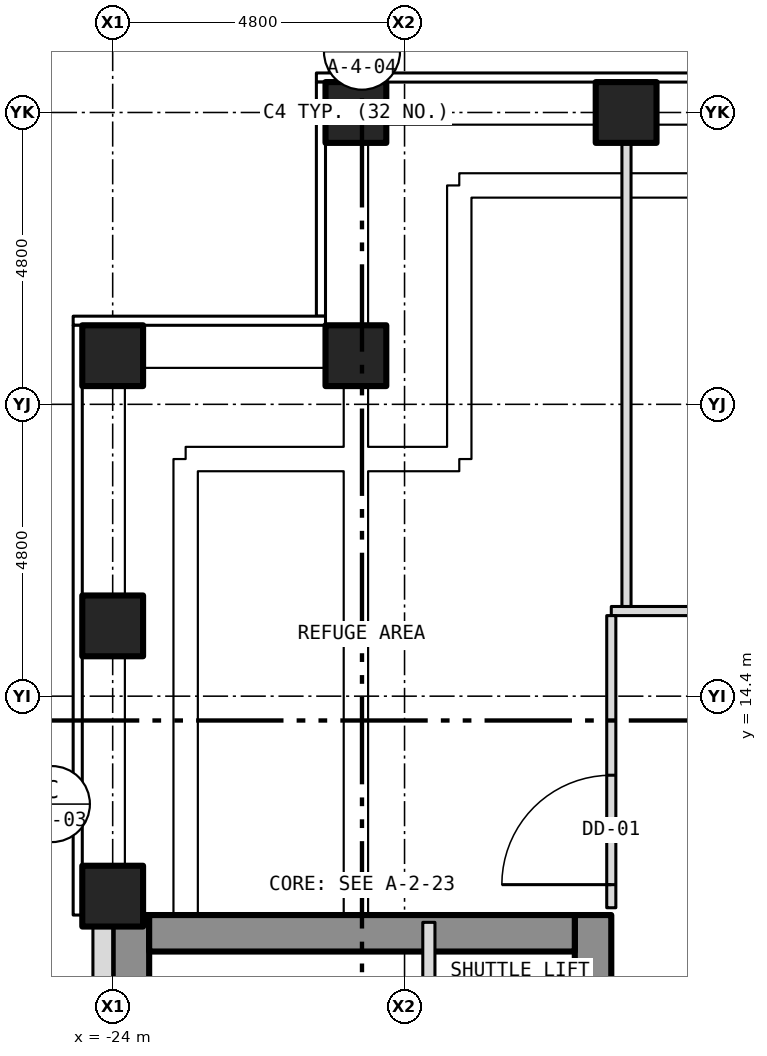
"""IFC4 building model, lengths in metres.
Left out: names, types, materials, properties, quantities, classifications, styles, units other than length and angle.
Written with IfcOpenShell. Run it as: python <this file> out.ifc"""

import sys

from ifc_helpers import new_model, si_unit, direction, frame, frame_2d, origin, origin_2d, place, context, subcontext, project, spatial, rectangle, hollow_rectangle, extrude, element, fill, save


model = new_model("IFC4")
c1 = context("Model", 3, precision=1e-05, world=origin(), true_north=direction((0.0, 1.0)))
c2 = subcontext(c1, "Body", "Model", "MODEL_VIEW")
j1 = project(units=[si_unit("LENGTHUNIT", "METRE"), si_unit("PLANEANGLEUNIT", "RADIAN")], contexts=[c1])
p1 = place(None, origin())
s1 = spatial("IfcSite", under=j1, at=p1, CompositionType="ELEMENT")
p2 = place(p1, origin())
s2 = spatial("IfcBuilding", under=s1, at=p2, CompositionType="ELEMENT")
p3 = place(p2, frame((0.0, 0.0, 84.5)))
s3 = spatial("IfcBuildingStorey", under=s2, at=p3, CompositionType="ELEMENT", Elevation=84.5)
for number, where, z_axis, x_axis in (
    (1, (-20.0, 24.0, -0.3), (0.0, 0.0, 1.0), (1.0, 0.0, 0.0)),
    (2, (-15.556, 24.0, -0.3), (0.0, 0.0, 1.0), (1.0, 0.0, 0.0)),
    (3, (-24.0, 11.111, -0.3), (0.0, 0.0, 1.0), (1.0, 0.0, 0.0)),
    (4, (-24.0, 15.556, -0.3), (0.0, 0.0, 1.0), (1.0, 0.0, 0.0)),
    (5, (-24.0, 20.0, -0.3), (0.0, 0.0, 1.0), (1.0, 0.0, 0.0)),
    (6, (-20.0, 20.0, -0.3), (0.0, 0.0, 1.0), (1.0, 0.0, 0.0)),
):
    element("IfcColumn", number, at=place(p3, frame(where, z_axis=z_axis, x_axis=x_axis)), inside=s3, PredefinedType="COLUMN", context=c2, shape_type="SweptSolid", body=[
        extrude(hollow_rectangle(XDim=1.0, YDim=1.0, WallThickness=0.06, at=origin_2d()), origin(), (0.0, 0.0, 1.0), 4.65),
    ])
p4 = place(p3, frame((-16.1, -10.8, 0.0), z_axis=(0.0, 0.0, 1.0), x_axis=(0.0, 1.0, 0.0)))
e7 = element("IfcWall", 7, at=p4, inside=s3, PredefinedType="SHEAR", context=c2, shape_type="SweptSolid", body=[
    extrude(rectangle(XDim=21.6, YDim=0.6, at=frame_2d((10.8, 0.0))), origin(), (0.0, 0.0, 1.0), 3.9),
])
p5 = place(p4, frame((9.4, 0.0, 0.0)))
e8 = element("IfcOpeningElement", 8, at=p5, cuts=e7, PredefinedType="OPENING", context=c2, shape_type="SweptSolid", body=[
    extrude(rectangle(XDim=1.1, YDim=2.1, at=frame_2d((0.55, 1.05))), frame((0.0, 0.312, 0.0), z_axis=(0.0, -1.0, 0.0), x_axis=(1.0, 0.0, 0.0)), (0.0, 0.0, 1.0), 0.624),
])
p6 = place(p4, frame((11.5, 0.0, 0.0)))
e9 = element("IfcOpeningElement", 9, at=p6, cuts=e7, PredefinedType="OPENING", context=c2, shape_type="SweptSolid", body=[
    extrude(rectangle(XDim=1.1, YDim=2.1, at=frame_2d((0.55, 1.05))), frame((0.0, 0.312, 0.0), z_axis=(0.0, -1.0, 0.0), x_axis=(1.0, 0.0, 0.0)), (0.0, 0.0, 1.0), 0.624),
])
p7 = place(p4, frame((13.6, 0.0, 0.0)))
e10 = element("IfcOpeningElement", 10, at=p7, cuts=e7, PredefinedType="OPENING", context=c2, shape_type="SweptSolid", body=[
    extrude(rectangle(XDim=1.1, YDim=2.1, at=frame_2d((0.55, 1.05))), frame((0.0, 0.312, 0.0), z_axis=(0.0, -1.0, 0.0), x_axis=(1.0, 0.0, 0.0)), (0.0, 0.0, 1.0), 0.624),
])
p8 = place(p4, frame((15.7, 0.0, 0.0)))
e11 = element("IfcOpeningElement", 11, at=p8, cuts=e7, PredefinedType="OPENING", context=c2, shape_type="SweptSolid", body=[
    extrude(rectangle(XDim=1.1, YDim=2.1, at=frame_2d((0.55, 1.05))), frame((0.0, 0.312, 0.0), z_axis=(0.0, -1.0, 0.0), x_axis=(1.0, 0.0, 0.0)), (0.0, 0.0, 1.0), 0.624),
])
p9 = place(p4, frame((17.8, 0.0, 0.0)))
e12 = element("IfcOpeningElement", 12, at=p9, cuts=e7, PredefinedType="OPENING", context=c2, shape_type="SweptSolid", body=[
    extrude(rectangle(XDim=1.1, YDim=2.1, at=frame_2d((0.55, 1.05))), frame((0.0, 0.312, 0.0), z_axis=(0.0, -1.0, 0.0), x_axis=(1.0, 0.0, 0.0)), (0.0, 0.0, 1.0), 0.624),
])
p10 = place(p4, frame((0.758, 0.0, 0.0)))
e13 = element("IfcOpeningElement", 13, at=p10, cuts=e7, PredefinedType="OPENING", context=c2, shape_type="SweptSolid", body=[
    extrude(rectangle(XDim=1.1, YDim=2.1, at=frame_2d((0.55, 1.05))), frame((0.0, 0.312, 0.0), z_axis=(0.0, -1.0, 0.0), x_axis=(1.0, 0.0, 0.0)), (0.0, 0.0, 1.0), 0.624),
])
p11 = place(p4, frame((7.5, 0.0, 0.0)))
e14 = element("IfcOpeningElement", 14, at=p11, cuts=e7, PredefinedType="OPENING", context=c2, shape_type="SweptSolid", body=[
    extrude(rectangle(XDim=1.1, YDim=2.1, at=frame_2d((0.55, 1.05))), frame((0.0, 0.312, 0.0), z_axis=(0.0, -1.0, 0.0), x_axis=(1.0, 0.0, 0.0)), (0.0, 0.0, 1.0), 0.624),
])
p12 = place(p3, frame((-23.7, -10.8, 0.0), z_axis=(0.0, 0.0, 1.0), x_axis=(0.0, 1.0, 0.0)))
e15 = element("IfcWall", 15, at=p12, inside=s3, PredefinedType="SHEAR", context=c2, shape_type="SweptSolid", body=[
    extrude(rectangle(XDim=21.6, YDim=0.6, at=frame_2d((10.8, 0.0))), origin(), (0.0, 0.0, 1.0), 3.9),
])
p13 = place(p3, frame((-23.4, 10.5, 0.0), z_axis=(0.0, 0.0, 1.0), x_axis=(1.0, 0.0, 0.0)))
e16 = element("IfcWall", 16, at=p13, inside=s3, PredefinedType="SHEAR", context=c2, shape_type="SweptSolid", body=[
    extrude(rectangle(XDim=7.0, YDim=0.6, at=frame_2d((3.5, 0.0))), origin(), (0.0, 0.0, 1.0), 3.9),
])
p14 = place(p3, frame((-24.163, 10.8, 0.0), z_axis=(0.0, 0.0, 1.0), x_axis=(0.0, -1.0, 0.0)))
e17 = element("IfcWall", 17, at=p14, inside=s3, PredefinedType="SOLIDWALL", context=c2, shape_type="SweptSolid", body=[
    extrude(rectangle(XDim=21.6, YDim=0.325, at=frame_2d((10.8, 0.0))), origin(), (0.0, 0.0, 1.0), 4.5),
])
p15 = place(p14, frame((3.0, 0.0, 2.2)))
e18 = element("IfcOpeningElement", 18, at=p15, cuts=e17, PredefinedType="OPENING", context=c2, shape_type="SweptSolid", body=[
    extrude(rectangle(XDim=1.2, YDim=0.6, at=frame_2d((0.6, 0.3))), frame((0.0, 0.175, 0.0), z_axis=(0.0, -1.0, 0.0), x_axis=(1.0, 0.0, 0.0)), (0.0, 0.0, 1.0), 0.349),
])
p16 = place(p14, frame((7.8, 0.0, 2.2)))
e19 = element("IfcOpeningElement", 19, at=p16, cuts=e17, PredefinedType="OPENING", context=c2, shape_type="SweptSolid", body=[
    extrude(rectangle(XDim=1.2, YDim=0.6, at=frame_2d((0.6, 0.3))), frame((0.0, 0.175, 0.0), z_axis=(0.0, -1.0, 0.0), x_axis=(1.0, 0.0, 0.0)), (0.0, 0.0, 1.0), 0.349),
])
p17 = place(p14, frame((12.6, 0.0, 2.2)))
e20 = element("IfcOpeningElement", 20, at=p17, cuts=e17, PredefinedType="OPENING", context=c2, shape_type="SweptSolid", body=[
    extrude(rectangle(XDim=1.2, YDim=0.6, at=frame_2d((0.6, 0.3))), frame((0.0, 0.175, 0.0), z_axis=(0.0, -1.0, 0.0), x_axis=(1.0, 0.0, 0.0)), (0.0, 0.0, 1.0), 0.349),
])
p18 = place(p14, frame((17.4, 0.0, 2.2)))
e21 = element("IfcOpeningElement", 21, at=p18, cuts=e17, PredefinedType="OPENING", context=c2, shape_type="SweptSolid", body=[
    extrude(rectangle(XDim=1.2, YDim=0.6, at=frame_2d((0.6, 0.3))), frame((0.0, 0.175, 0.0), z_axis=(0.0, -1.0, 0.0), x_axis=(1.0, 0.0, 0.0)), (0.0, 0.0, 1.0), 0.349),
])
p19 = place(p3, frame((-15.8, 15.8, 0.0), z_axis=(0.0, 0.0, 1.0), x_axis=(1.0, 0.0, 0.0)))
e22 = element("IfcWall", 22, at=p19, inside=s3, PredefinedType="PARTITIONING", context=c2, shape_type="SweptSolid", body=[
    extrude(rectangle(XDim=31.6, YDim=0.15, at=frame_2d((15.8, 0.0))), origin(), (0.0, 0.0, 1.0), 4.35),
])
p20 = place(p19, frame((4.98, 0.0, 0.0)))
e23 = element("IfcOpeningElement", 23, at=p20, cuts=e22, PredefinedType="OPENING", context=c2, shape_type="SweptSolid", body=[
    extrude(rectangle(XDim=0.9, YDim=2.1, at=frame_2d((0.45, 1.05))), frame((0.0, 0.087, 0.0), z_axis=(0.0, -1.0, 0.0), x_axis=(1.0, 0.0, 0.0)), (0.0, 0.0, 1.0), 0.174),
])
p21 = place(p19, frame((15.35, 0.0, 0.0)))
e24 = element("IfcOpeningElement", 24, at=p21, cuts=e22, PredefinedType="OPENING", context=c2, shape_type="SweptSolid", body=[
    extrude(rectangle(XDim=0.9, YDim=2.1, at=frame_2d((0.45, 1.05))), frame((0.0, 0.087, 0.0), z_axis=(0.0, -1.0, 0.0), x_axis=(1.0, 0.0, 0.0)), (0.0, 0.0, 1.0), 0.174),
])
p22 = place(p19, frame((25.721, 0.0, 0.0)))
e25 = element("IfcOpeningElement", 25, at=p22, cuts=e22, PredefinedType="OPENING", context=c2, shape_type="SweptSolid", body=[
    extrude(rectangle(XDim=0.9, YDim=2.1, at=frame_2d((0.45, 1.05))), frame((0.0, 0.087, 0.0), z_axis=(0.0, -1.0, 0.0), x_axis=(1.0, 0.0, 0.0)), (0.0, 0.0, 1.0), 0.174),
])
p23 = place(p3, frame((-18.8, -1.8, 0.0), z_axis=(0.0, 0.0, 1.0), x_axis=(0.0, 1.0, 0.0)))
e26 = element("IfcWall", 26, at=p23, inside=s3, PredefinedType="PARTITIONING", context=c2, shape_type="SweptSolid", body=[
    extrude(rectangle(XDim=12.48, YDim=0.2, at=frame_2d((6.24, 0.0))), origin(), (0.0, 0.0, 1.0), 3.9),
])
p24 = place(p3, frame((-15.8, 10.92, 0.0), z_axis=(0.0, 0.0, 1.0), x_axis=(0.0, 1.0, 0.0)))
e27 = element("IfcWall", 27, at=p24, inside=s3, PredefinedType="PARTITIONING", context=c2, shape_type="SweptSolid", body=[
    extrude(rectangle(XDim=4.805, YDim=0.15, at=frame_2d((2.403, 0.0))), origin(), (0.0, 0.0, 1.0), 4.35),
])
p25 = place(p24, frame((0.38, 0.0, 0.0)))
e28 = element("IfcOpeningElement", 28, at=p25, cuts=e27, PredefinedType="OPENING", context=c2, shape_type="SweptSolid", body=[
    extrude(rectangle(XDim=1.8, YDim=2.1, at=frame_2d((0.9, 1.05))), frame((0.0, 0.087, 0.0), z_axis=(0.0, -1.0, 0.0), x_axis=(1.0, 0.0, 0.0)), (0.0, 0.0, 1.0), 0.174),
])
p26 = place(p3, frame((-15.55, 15.875, 0.0), z_axis=(0.0, 0.0, 1.0), x_axis=(0.0, 1.0, 0.0)))
e29 = element("IfcWall", 29, at=p26, inside=s3, PredefinedType="PARTITIONING", context=c2, shape_type="SweptSolid", body=[
    extrude(rectangle(XDim=8.005, YDim=0.15, at=frame_2d((4.002, 0.0))), origin(), (0.0, 0.0, 1.0), 4.35),
])
p27 = place(p25, origin())
e30 = element("IfcDoor", 30, at=p27, inside=s3, OperationType="DOUBLE_DOOR_SINGLE_SWING", PredefinedType="DOOR", context=c2, shape_type="SweptSolid", body=[
    extrude(rectangle(XDim=1.8, YDim=2.1, at=frame_2d((0.9, 1.05))), frame((0.0, 0.025, 0.0), z_axis=(0.0, -1.0, 0.0), x_axis=(1.0, 0.0, 0.0)), (0.0, 0.0, 1.0), 0.05),
])
fill(e28, e30)
save(model, sys.argv[1])
